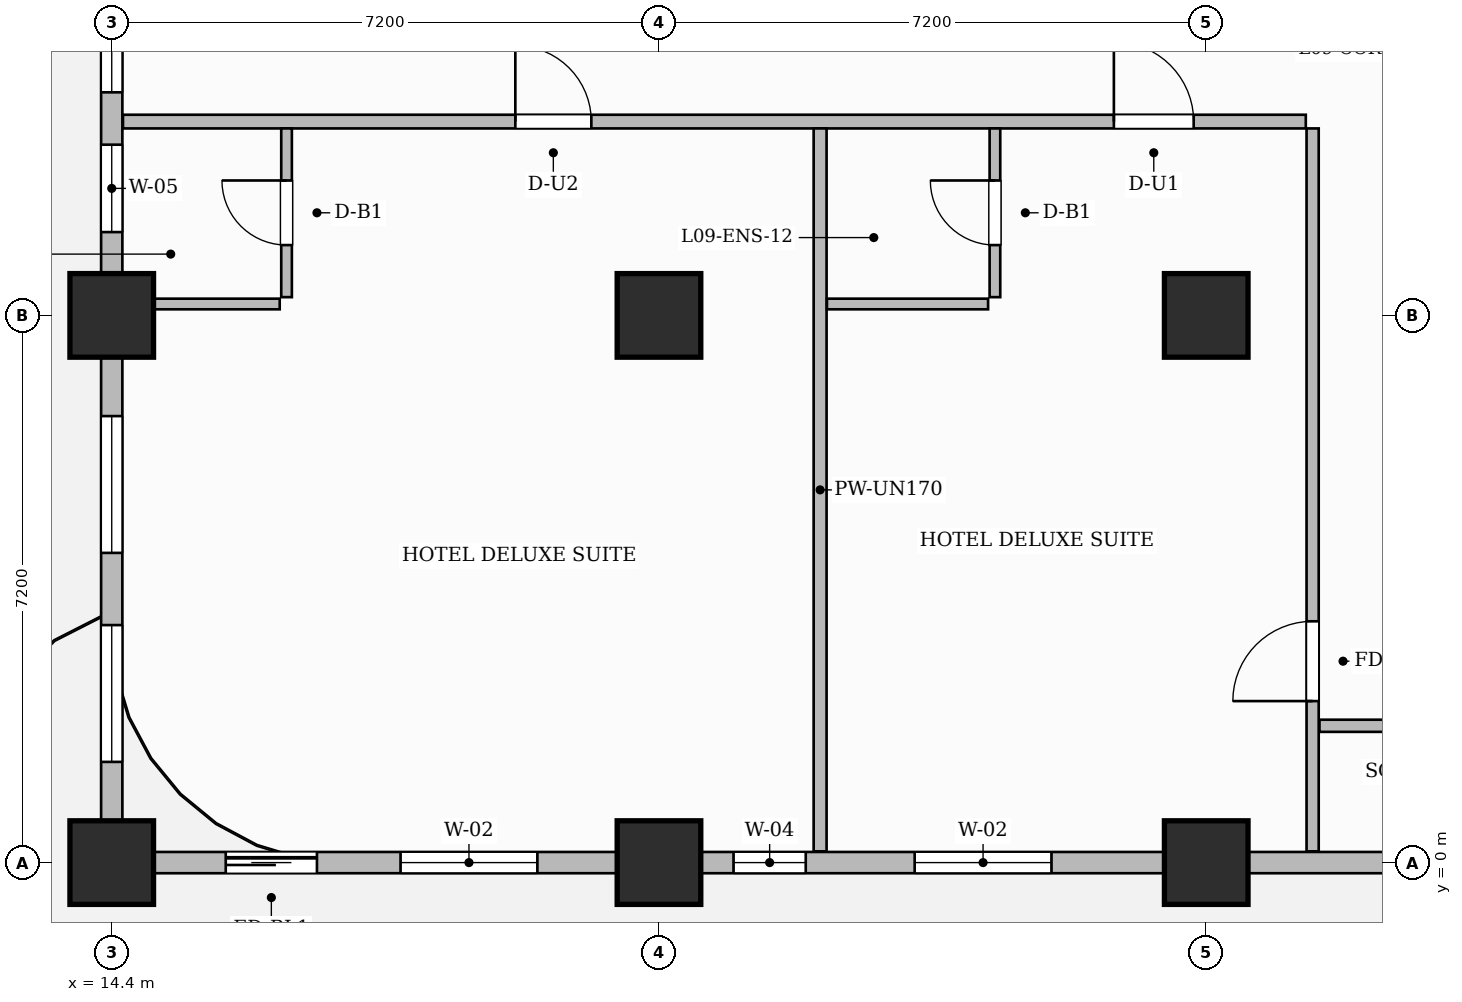
"""IFC4 building model, lengths in metres.
Left out: names, types, materials, properties, quantities, classifications, styles, units other than length and angle.
Written with IfcOpenShell. Run it as: python <this file> out.ifc"""

import sys

from ifc_helpers import new_model, si_unit, direction, frame, frame_2d, origin, origin_2d, place, context, subcontext, project, spatial, rectangle, extrude, source, transform, mapped, element, fill, save


model = new_model("IFC4")
c1 = context("Model", 3, precision=1e-05, world=origin(), true_north=direction((0.0, 1.0)))
c2 = subcontext(c1, "Body", "Model", "MODEL_VIEW")
j1 = project(units=[si_unit("LENGTHUNIT", "METRE"), si_unit("PLANEANGLEUNIT", "RADIAN")], contexts=[c1])
p1 = place(None, origin())
s1 = spatial("IfcSite", under=j1, at=p1, CompositionType="ELEMENT")
p2 = place(p1, origin())
s2 = spatial("IfcBuilding", under=s1, at=p2, CompositionType="ELEMENT")
p3 = place(p2, frame((0.0, 0.0, 43.5)))
s3 = spatial("IfcBuildingStorey", under=s2, at=p3, CompositionType="ELEMENT", Elevation=43.5)
m1 = source(origin(), c2, "Body", "SweptSolid", [
    extrude(rectangle(XDim=1.1, YDim=1.1, at=origin_2d()), origin(), (0.0, 0.0, 1.0), 3.7),
])
for number, where, z_axis, x_axis in (
    (1, (14.4, 0.0, 0.0), (0.0, 0.0, 1.0), (1.0, 0.0, 0.0)),
    (2, (14.4, 7.2, 0.0), (0.0, 0.0, 1.0), (1.0, 0.0, 0.0)),
    (3, (21.6, 0.0, 0.0), (0.0, 0.0, 1.0), (1.0, 0.0, 0.0)),
    (4, (21.6, 7.2, 0.0), (0.0, 0.0, 1.0), (1.0, 0.0, 0.0)),
    (5, (28.8, 0.0, 0.0), (0.0, 0.0, 1.0), (1.0, 0.0, 0.0)),
    (6, (28.8, 7.2, 0.0), (0.0, 0.0, 1.0), (1.0, 0.0, 0.0)),
):
    element("IfcColumn", number, at=place(p3, frame(where, z_axis=z_axis, x_axis=x_axis)), inside=s3, PredefinedType="COLUMN", context=c2, shape_type="MappedRepresentation", body=[
        mapped(m1, transform((0.0, 0.0, 0.0), scale=1.0)),
    ])
p4 = place(p3, frame((14.548, 9.75, 0.0), z_axis=(0.0, 0.0, 1.0), x_axis=(1.0, 0.0, 0.0)))
e7 = element("IfcWall", 7, at=p4, inside=s3, PredefinedType="PARTITIONING", context=c2, shape_type="SweptSolid", body=[
    extrude(rectangle(XDim=15.562, YDim=0.18, at=frame_2d((7.781, 0.0))), origin(), (0.0, 0.0, 1.0), 3.45),
])
p5 = place(p4, frame((5.162, 0.0, 0.0)))
e8 = element("IfcOpeningElement", 8, at=p5, cuts=e7, PredefinedType="OPENING", context=c2, shape_type="SweptSolid", body=[
    extrude(rectangle(XDim=1.0, YDim=2.2, at=frame_2d((0.5, 1.1))), frame((0.0, 0.1, 0.0), z_axis=(0.0, -1.0, 0.0), x_axis=(1.0, 0.0, 0.0)), (0.0, 0.0, 1.0), 0.2),
])
p6 = place(p4, frame((13.037, 0.0, 0.0)))
e9 = element("IfcOpeningElement", 9, at=p6, cuts=e7, PredefinedType="OPENING", context=c2, shape_type="SweptSolid", body=[
    extrude(rectangle(XDim=1.05, YDim=2.25, at=frame_2d((0.525, 1.125))), frame((0.0, 0.1, 0.0), z_axis=(0.0, -1.0, 0.0), x_axis=(1.0, 0.0, 0.0)), (0.0, 0.0, 1.0), 0.2),
])
p7 = place(p3, frame((30.2, 0.148, 0.0), z_axis=(0.0, 0.0, 1.0), x_axis=(0.0, 1.0, 0.0)))
e10 = element("IfcWall", 10, at=p7, inside=s3, PredefinedType="PARTITIONING", context=c2, shape_type="SweptSolid", body=[
    extrude(rectangle(XDim=9.512, YDim=0.16, at=frame_2d((4.756, 0.0))), origin(), (0.0, 0.0, 1.0), 3.45),
])
p8 = place(p7, frame((1.977, 0.0, 0.0)))
e11 = element("IfcOpeningElement", 11, at=p8, cuts=e10, PredefinedType="OPENING", context=c2, shape_type="SweptSolid", body=[
    extrude(rectangle(XDim=1.05, YDim=2.15, at=frame_2d((0.525, 1.075))), frame((0.0, 0.09, 0.0), z_axis=(0.0, -1.0, 0.0), x_axis=(1.0, 0.0, 0.0)), (0.0, 0.0, 1.0), 0.18),
])
p9 = place(p3, frame((30.29, 1.8, 0.0), z_axis=(0.0, 0.0, 1.0), x_axis=(1.0, 0.0, 0.0)))
e12 = element("IfcWall", 12, at=p9, inside=s3, PredefinedType="PARTITIONING", context=c2, shape_type="SweptSolid", body=[
    extrude(rectangle(XDim=19.37, YDim=0.16, at=frame_2d((9.685, 0.0))), origin(), (0.0, 0.0, 1.0), 3.45),
])
p10 = place(p9, frame((5.213, 0.0, 0.0)))
e13 = element("IfcOpeningElement", 13, at=p10, cuts=e12, PredefinedType="OPENING", context=c2, shape_type="SweptSolid", body=[
    extrude(rectangle(XDim=0.9, YDim=2.15, at=frame_2d((0.45, 1.075))), frame((0.0, 0.09, 0.0), z_axis=(0.0, -1.0, 0.0), x_axis=(1.0, 0.0, 0.0)), (0.0, 0.0, 1.0), 0.18),
])
p11 = place(p9, frame((14.06, 0.0, 0.0)))
e14 = element("IfcOpeningElement", 14, at=p11, cuts=e12, PredefinedType="OPENING", context=c2, shape_type="SweptSolid", body=[
    extrude(rectangle(XDim=0.9, YDim=2.15, at=frame_2d((0.45, 1.075))), frame((0.0, 0.09, 0.0), z_axis=(0.0, -1.0, 0.0), x_axis=(1.0, 0.0, 0.0)), (0.0, 0.0, 1.0), 0.18),
])
p12 = place(p3, frame((23.72, 0.148, 0.0), z_axis=(0.0, 0.0, 1.0), x_axis=(0.0, 1.0, 0.0)))
e15 = element("IfcWall", 15, at=p12, inside=s3, PredefinedType="PARTITIONING", context=c2, shape_type="SweptSolid", body=[
    extrude(rectangle(XDim=9.512, YDim=0.17, at=frame_2d((4.756, 0.0))), origin(), (0.0, 0.0, 1.0), 3.45),
])
p13 = place(p3, frame((16.7, 7.44, 0.0), z_axis=(0.0, 0.0, 1.0), x_axis=(0.0, 1.0, 0.0)))
e16 = element("IfcWall", 16, at=p13, inside=s3, PredefinedType="PARTITIONING", context=c2, shape_type="SweptSolid", body=[
    extrude(rectangle(XDim=2.22, YDim=0.14, at=frame_2d((1.11, 0.0))), origin(), (0.0, 0.0, 1.0), 3.45),
])
p14 = place(p13, frame((0.685, 0.0, 0.0)))
e17 = element("IfcOpeningElement", 17, at=p14, cuts=e16, PredefinedType="OPENING", context=c2, shape_type="SweptSolid", body=[
    extrude(rectangle(XDim=0.85, YDim=2.1, at=frame_2d((0.425, 1.05))), frame((0.0, 0.08, 0.0), z_axis=(0.0, -1.0, 0.0), x_axis=(1.0, 0.0, 0.0)), (0.0, 0.0, 1.0), 0.16),
])
p15 = place(p3, frame((14.49, 7.35, 0.0), z_axis=(0.0, 0.0, 1.0), x_axis=(1.0, 0.0, 0.0)))
e18 = element("IfcWall", 18, at=p15, inside=s3, PredefinedType="PARTITIONING", context=c2, shape_type="SweptSolid", body=[
    extrude(rectangle(XDim=2.12, YDim=0.14, at=frame_2d((1.06, 0.0))), origin(), (0.0, 0.0, 1.0), 2.885),
])
p16 = place(p3, frame((26.02, 7.44, 0.0), z_axis=(0.0, 0.0, 1.0), x_axis=(0.0, 1.0, 0.0)))
e19 = element("IfcWall", 19, at=p16, inside=s3, PredefinedType="PARTITIONING", context=c2, shape_type="SweptSolid", body=[
    extrude(rectangle(XDim=2.22, YDim=0.14, at=frame_2d((1.11, 0.0))), origin(), (0.0, 0.0, 1.0), 3.45),
])
p17 = place(p16, frame((0.685, 0.0, 0.0)))
e20 = element("IfcOpeningElement", 20, at=p17, cuts=e19, PredefinedType="OPENING", context=c2, shape_type="SweptSolid", body=[
    extrude(rectangle(XDim=0.85, YDim=2.1, at=frame_2d((0.425, 1.05))), frame((0.0, 0.08, 0.0), z_axis=(0.0, -1.0, 0.0), x_axis=(1.0, 0.0, 0.0)), (0.0, 0.0, 1.0), 0.16),
])
p18 = place(p3, frame((23.81, 7.35, 0.0), z_axis=(0.0, 0.0, 1.0), x_axis=(1.0, 0.0, 0.0)))
e21 = element("IfcWall", 21, at=p18, inside=s3, PredefinedType="PARTITIONING", context=c2, shape_type="SweptSolid", body=[
    extrude(rectangle(XDim=2.12, YDim=0.14, at=frame_2d((1.06, 0.0))), origin(), (0.0, 0.0, 1.0), 2.885),
])
p19 = place(p3, frame((14.4, 0.0, 0.0), z_axis=(0.0, 0.0, 1.0), x_axis=(1.0, 0.0, 0.0)))
e22 = element("IfcWall", 22, at=p19, inside=s3, PredefinedType="SOLIDWALL", context=c2, shape_type="SweptSolid", body=[
    extrude(rectangle(XDim=43.2, YDim=0.28, at=frame_2d((21.6, 0.0))), origin(), (0.0, 0.0, 1.0), 2.885),
])
p20 = place(p19, frame((1.5, 0.0, 0.0)))
e23 = element("IfcOpeningElement", 23, at=p20, cuts=e22, PredefinedType="OPENING", context=c2, shape_type="SweptSolid", body=[
    extrude(rectangle(XDim=1.2, YDim=2.2, at=frame_2d((0.6, 1.1))), frame((0.0, 0.15, 0.0), z_axis=(0.0, -1.0, 0.0), x_axis=(1.0, 0.0, 0.0)), (0.0, 0.0, 1.0), 0.3),
])
p21 = place(p19, frame((3.8, 0.0, 0.8)))
e24 = element("IfcOpeningElement", 24, at=p21, cuts=e22, PredefinedType="OPENING", context=c2, shape_type="SweptSolid", body=[
    extrude(rectangle(XDim=1.8, YDim=1.85, at=frame_2d((0.9, 0.925))), frame((0.0, 0.15, 0.0), z_axis=(0.0, -1.0, 0.0), x_axis=(1.0, 0.0, 0.0)), (0.0, 0.0, 1.0), 0.3),
])
p22 = place(p19, frame((8.181, 0.0, 0.8)))
e25 = element("IfcOpeningElement", 25, at=p22, cuts=e22, PredefinedType="OPENING", context=c2, shape_type="SweptSolid", body=[
    extrude(rectangle(XDim=0.95, YDim=1.75, at=frame_2d((0.475, 0.875))), frame((0.0, 0.15, 0.0), z_axis=(0.0, -1.0, 0.0), x_axis=(1.0, 0.0, 0.0)), (0.0, 0.0, 1.0), 0.3),
])
p23 = place(p19, frame((10.564, 0.0, 0.8)))
e26 = element("IfcOpeningElement", 26, at=p23, cuts=e22, PredefinedType="OPENING", context=c2, shape_type="SweptSolid", body=[
    extrude(rectangle(XDim=1.8, YDim=1.85, at=frame_2d((0.9, 0.925))), frame((0.0, 0.15, 0.0), z_axis=(0.0, -1.0, 0.0), x_axis=(1.0, 0.0, 0.0)), (0.0, 0.0, 1.0), 0.3),
])
p24 = place(p19, frame((16.804, 0.0, 0.8)))
e27 = element("IfcOpeningElement", 27, at=p24, cuts=e22, PredefinedType="OPENING", context=c2, shape_type="SweptSolid", body=[
    extrude(rectangle(XDim=1.8, YDim=1.85, at=frame_2d((0.9, 0.925))), frame((0.0, 0.15, 0.0), z_axis=(0.0, -1.0, 0.0), x_axis=(1.0, 0.0, 0.0)), (0.0, 0.0, 1.0), 0.3),
])
p25 = place(p19, frame((22.396, 0.0, 0.8)))
e28 = element("IfcOpeningElement", 28, at=p25, cuts=e22, PredefinedType="OPENING", context=c2, shape_type="SweptSolid", body=[
    extrude(rectangle(XDim=1.8, YDim=1.85, at=frame_2d((0.9, 0.925))), frame((0.0, 0.15, 0.0), z_axis=(0.0, -1.0, 0.0), x_axis=(1.0, 0.0, 0.0)), (0.0, 0.0, 1.0), 0.3),
])
p26 = place(p19, frame((25.629, 0.0, 0.8)))
e29 = element("IfcOpeningElement", 29, at=p26, cuts=e22, PredefinedType="OPENING", context=c2, shape_type="SweptSolid", body=[
    extrude(rectangle(XDim=0.95, YDim=1.75, at=frame_2d((0.475, 0.875))), frame((0.0, 0.15, 0.0), z_axis=(0.0, -1.0, 0.0), x_axis=(1.0, 0.0, 0.0)), (0.0, 0.0, 1.0), 0.3),
])
p27 = place(p19, frame((29.075, 0.0, 0.8)))
e30 = element("IfcOpeningElement", 30, at=p27, cuts=e22, PredefinedType="OPENING", context=c2, shape_type="SweptSolid", body=[
    extrude(rectangle(XDim=1.8, YDim=1.85, at=frame_2d((0.9, 0.925))), frame((0.0, 0.15, 0.0), z_axis=(0.0, -1.0, 0.0), x_axis=(1.0, 0.0, 0.0)), (0.0, 0.0, 1.0), 0.3),
])
p28 = place(p19, frame((32.125, 0.0, 0.8)))
e31 = element("IfcOpeningElement", 31, at=p28, cuts=e22, PredefinedType="OPENING", context=c2, shape_type="SweptSolid", body=[
    extrude(rectangle(XDim=1.8, YDim=1.85, at=frame_2d((0.9, 0.925))), frame((0.0, 0.15, 0.0), z_axis=(0.0, -1.0, 0.0), x_axis=(1.0, 0.0, 0.0)), (0.0, 0.0, 1.0), 0.3),
])
p29 = place(p19, frame((36.946, 0.0, 0.8)))
e32 = element("IfcOpeningElement", 32, at=p29, cuts=e22, PredefinedType="OPENING", context=c2, shape_type="SweptSolid", body=[
    extrude(rectangle(XDim=1.8, YDim=1.85, at=frame_2d((0.9, 0.925))), frame((0.0, 0.15, 0.0), z_axis=(0.0, -1.0, 0.0), x_axis=(1.0, 0.0, 0.0)), (0.0, 0.0, 1.0), 0.3),
])
p30 = place(p19, frame((40.054, 0.0, 0.8)))
e33 = element("IfcOpeningElement", 33, at=p30, cuts=e22, PredefinedType="OPENING", context=c2, shape_type="SweptSolid", body=[
    extrude(rectangle(XDim=1.8, YDim=1.85, at=frame_2d((0.9, 0.925))), frame((0.0, 0.15, 0.0), z_axis=(0.0, -1.0, 0.0), x_axis=(1.0, 0.0, 0.0)), (0.0, 0.0, 1.0), 0.3),
])
p31 = place(p3, frame((14.4, 0.05, 0.0), z_axis=(0.0, 0.0, 1.0), x_axis=(0.0, 1.0, 0.0)))
e34 = element("IfcWall", 34, at=p31, inside=s3, PredefinedType="SOLIDWALL", context=c2, shape_type="SweptSolid", body=[
    extrude(rectangle(XDim=21.5, YDim=0.28, at=frame_2d((10.75, 0.0))), origin(), (0.0, 0.0, 1.0), 2.885),
])
p32 = place(p31, frame((1.275, 0.0, 0.8)))
e35 = element("IfcOpeningElement", 35, at=p32, cuts=e34, PredefinedType="OPENING", context=c2, shape_type="SweptSolid", body=[
    extrude(rectangle(XDim=1.8, YDim=1.85, at=frame_2d((0.9, 0.925))), frame((0.0, 0.15, 0.0), z_axis=(0.0, -1.0, 0.0), x_axis=(1.0, 0.0, 0.0)), (0.0, 0.0, 1.0), 0.3),
])
p33 = place(p31, frame((4.025, 0.0, 0.8)))
e36 = element("IfcOpeningElement", 36, at=p33, cuts=e34, PredefinedType="OPENING", context=c2, shape_type="SweptSolid", body=[
    extrude(rectangle(XDim=1.8, YDim=1.85, at=frame_2d((0.9, 0.925))), frame((0.0, 0.15, 0.0), z_axis=(0.0, -1.0, 0.0), x_axis=(1.0, 0.0, 0.0)), (0.0, 0.0, 1.0), 0.3),
])
p34 = place(p31, frame((8.246, 0.0, 0.8)))
e37 = element("IfcOpeningElement", 37, at=p34, cuts=e34, PredefinedType="OPENING", context=c2, shape_type="SweptSolid", body=[
    extrude(rectangle(XDim=1.15, YDim=1.8, at=frame_2d((0.575, 0.9))), frame((0.0, 0.15, 0.0), z_axis=(0.0, -1.0, 0.0), x_axis=(1.0, 0.0, 0.0)), (0.0, 0.0, 1.0), 0.3),
])
p35 = place(p31, frame((10.085, 0.0, 0.8)))
e38 = element("IfcOpeningElement", 38, at=p35, cuts=e34, PredefinedType="OPENING", context=c2, shape_type="SweptSolid", body=[
    extrude(rectangle(XDim=1.15, YDim=1.8, at=frame_2d((0.575, 0.9))), frame((0.0, 0.15, 0.0), z_axis=(0.0, -1.0, 0.0), x_axis=(1.0, 0.0, 0.0)), (0.0, 0.0, 1.0), 0.3),
])
p36 = place(p31, frame((12.014, 0.0, 0.8)))
e39 = element("IfcOpeningElement", 39, at=p36, cuts=e34, PredefinedType="OPENING", context=c2, shape_type="SweptSolid", body=[
    extrude(rectangle(XDim=1.15, YDim=1.8, at=frame_2d((0.575, 0.9))), frame((0.0, 0.15, 0.0), z_axis=(0.0, -1.0, 0.0), x_axis=(1.0, 0.0, 0.0)), (0.0, 0.0, 1.0), 0.3),
])
p37 = place(p31, frame((15.406, 0.0, 0.8)))
e40 = element("IfcOpeningElement", 40, at=p37, cuts=e34, PredefinedType="OPENING", context=c2, shape_type="SweptSolid", body=[
    extrude(rectangle(XDim=0.95, YDim=1.75, at=frame_2d((0.475, 0.875))), frame((0.0, 0.15, 0.0), z_axis=(0.0, -1.0, 0.0), x_axis=(1.0, 0.0, 0.0)), (0.0, 0.0, 1.0), 0.3),
])
p38 = place(p31, frame((17.789, 0.0, 0.8)))
e41 = element("IfcOpeningElement", 41, at=p38, cuts=e34, PredefinedType="OPENING", context=c2, shape_type="SweptSolid", body=[
    extrude(rectangle(XDim=1.8, YDim=1.85, at=frame_2d((0.9, 0.925))), frame((0.0, 0.15, 0.0), z_axis=(0.0, -1.0, 0.0), x_axis=(1.0, 0.0, 0.0)), (0.0, 0.0, 1.0), 0.3),
])
m2 = source(origin(), c2, "Body", "SweptSolid", [
    extrude(rectangle(XDim=1.05, YDim=2.15, at=frame_2d((0.525, 1.075))), frame((0.0, 0.025, 0.0), z_axis=(0.0, -1.0, 0.0), x_axis=(1.0, 0.0, 0.0)), (0.0, 0.0, 1.0), 0.05),
])
p39 = place(p8, origin())
e42 = element("IfcDoor", 42, at=p39, inside=s3, OperationType="SINGLE_SWING_LEFT", PredefinedType="DOOR", context=c2, shape_type="MappedRepresentation", body=[
    mapped(m2, transform((0.0, 0.0, 0.0), scale=1.0)),
])
fill(e11, e42)
m3 = source(origin(), c2, "Body", "SweptSolid", [
    extrude(rectangle(XDim=0.85, YDim=2.1, at=frame_2d((0.425, 1.05))), frame((0.0, 0.025, 0.0), z_axis=(0.0, -1.0, 0.0), x_axis=(1.0, 0.0, 0.0)), (0.0, 0.0, 1.0), 0.05),
])
p40 = place(p14, origin())
e43 = element("IfcDoor", 43, at=p40, inside=s3, OperationType="SINGLE_SWING_RIGHT", PredefinedType="DOOR", context=c2, shape_type="MappedRepresentation", body=[
    mapped(m3, transform((0.0, 0.0, 0.0), scale=1.0)),
])
fill(e17, e43)
m4 = source(origin(), c2, "Body", "SweptSolid", [
    extrude(rectangle(XDim=1.0, YDim=2.2, at=frame_2d((0.5, 1.1))), frame((0.0, 0.025, 0.0), z_axis=(0.0, -1.0, 0.0), x_axis=(1.0, 0.0, 0.0)), (0.0, 0.0, 1.0), 0.05),
])
p41 = place(p5, origin())
e44 = element("IfcDoor", 44, at=p41, inside=s3, OperationType="SINGLE_SWING_LEFT", PredefinedType="DOOR", context=c2, shape_type="MappedRepresentation", body=[
    mapped(m4, transform((0.0, 0.0, 0.0), scale=1.0)),
])
fill(e8, e44)
p42 = place(p17, origin())
e45 = element("IfcDoor", 45, at=p42, inside=s3, OperationType="SINGLE_SWING_RIGHT", PredefinedType="DOOR", context=c2, shape_type="MappedRepresentation", body=[
    mapped(m3, transform((0.0, 0.0, 0.0), scale=1.0)),
])
fill(e20, e45)
m5 = source(origin(), c2, "Body", "SweptSolid", [
    extrude(rectangle(XDim=1.05, YDim=2.25, at=frame_2d((0.525, 1.125))), frame((0.0, 0.025, 0.0), z_axis=(0.0, -1.0, 0.0), x_axis=(1.0, 0.0, 0.0)), (0.0, 0.0, 1.0), 0.05),
])
p43 = place(p6, origin())
e46 = element("IfcDoor", 46, at=p43, inside=s3, OperationType="SINGLE_SWING_LEFT", PredefinedType="DOOR", context=c2, shape_type="MappedRepresentation", body=[
    mapped(m5, transform((0.0, 0.0, 0.0), scale=1.0)),
])
fill(e9, e46)
m6 = source(origin(), c2, "Body", "SweptSolid", [
    extrude(rectangle(XDim=1.2, YDim=2.2, at=frame_2d((0.6, 1.1))), frame((0.0, 0.025, 0.0), z_axis=(0.0, -1.0, 0.0), x_axis=(1.0, 0.0, 0.0)), (0.0, 0.0, 1.0), 0.05),
])
p44 = place(p20, origin())
e47 = element("IfcDoor", 47, at=p44, inside=s3, OperationType="SLIDING_TO_LEFT", PredefinedType="DOOR", context=c2, shape_type="MappedRepresentation", body=[
    mapped(m6, transform((0.0, 0.0, 0.0), scale=1.0)),
])
fill(e23, e47)
m7 = source(origin(), c2, "Body", "SweptSolid", [
    extrude(rectangle(XDim=1.8, YDim=1.85, at=frame_2d((0.9, 0.925))), frame((0.0, 0.03, 0.0), z_axis=(0.0, -1.0, 0.0), x_axis=(1.0, 0.0, 0.0)), (0.0, 0.0, 1.0), 0.06),
])
p45 = place(p21, origin())
e48 = element("IfcWindow", 48, at=p45, inside=s3, PartitioningType="DOUBLE_PANEL_VERTICAL", PredefinedType="WINDOW", context=c2, shape_type="MappedRepresentation", body=[
    mapped(m7, transform((0.0, 0.0, 0.0), scale=1.0)),
])
fill(e24, e48)
m8 = source(origin(), c2, "Body", "SweptSolid", [
    extrude(rectangle(XDim=0.95, YDim=1.75, at=frame_2d((0.475, 0.875))), frame((0.0, 0.03, 0.0), z_axis=(0.0, -1.0, 0.0), x_axis=(1.0, 0.0, 0.0)), (0.0, 0.0, 1.0), 0.06),
])
p46 = place(p22, origin())
e49 = element("IfcWindow", 49, at=p46, inside=s3, PartitioningType="SINGLE_PANEL", PredefinedType="WINDOW", context=c2, shape_type="MappedRepresentation", body=[
    mapped(m8, transform((0.0, 0.0, 0.0), scale=1.0)),
])
fill(e25, e49)
p47 = place(p23, origin())
e50 = element("IfcWindow", 50, at=p47, inside=s3, PartitioningType="DOUBLE_PANEL_VERTICAL", PredefinedType="WINDOW", context=c2, shape_type="MappedRepresentation", body=[
    mapped(m7, transform((0.0, 0.0, 0.0), scale=1.0)),
])
fill(e26, e50)
p48 = place(p32, origin())
e51 = element("IfcWindow", 51, at=p48, inside=s3, PartitioningType="DOUBLE_PANEL_VERTICAL", PredefinedType="WINDOW", context=c2, shape_type="MappedRepresentation", body=[
    mapped(m7, transform((0.0, 0.0, 0.0), scale=1.0)),
])
fill(e35, e51)
p49 = place(p33, origin())
e52 = element("IfcWindow", 52, at=p49, inside=s3, PartitioningType="DOUBLE_PANEL_VERTICAL", PredefinedType="WINDOW", context=c2, shape_type="MappedRepresentation", body=[
    mapped(m7, transform((0.0, 0.0, 0.0), scale=1.0)),
])
fill(e36, e52)
m9 = source(origin(), c2, "Body", "SweptSolid", [
    extrude(rectangle(XDim=1.15, YDim=1.8, at=frame_2d((0.575, 0.9))), frame((0.0, 0.03, 0.0), z_axis=(0.0, -1.0, 0.0), x_axis=(1.0, 0.0, 0.0)), (0.0, 0.0, 1.0), 0.06),
])
p50 = place(p34, origin())
e53 = element("IfcWindow", 53, at=p50, inside=s3, PartitioningType="SINGLE_PANEL", PredefinedType="WINDOW", context=c2, shape_type="MappedRepresentation", body=[
    mapped(m9, transform((0.0, 0.0, 0.0), scale=1.0)),
])
fill(e37, e53)
p51 = place(p35, origin())
e54 = element("IfcWindow", 54, at=p51, inside=s3, PartitioningType="SINGLE_PANEL", PredefinedType="WINDOW", context=c2, shape_type="MappedRepresentation", body=[
    mapped(m9, transform((0.0, 0.0, 0.0), scale=1.0)),
])
fill(e38, e54)
save(model, sys.argv[1])
